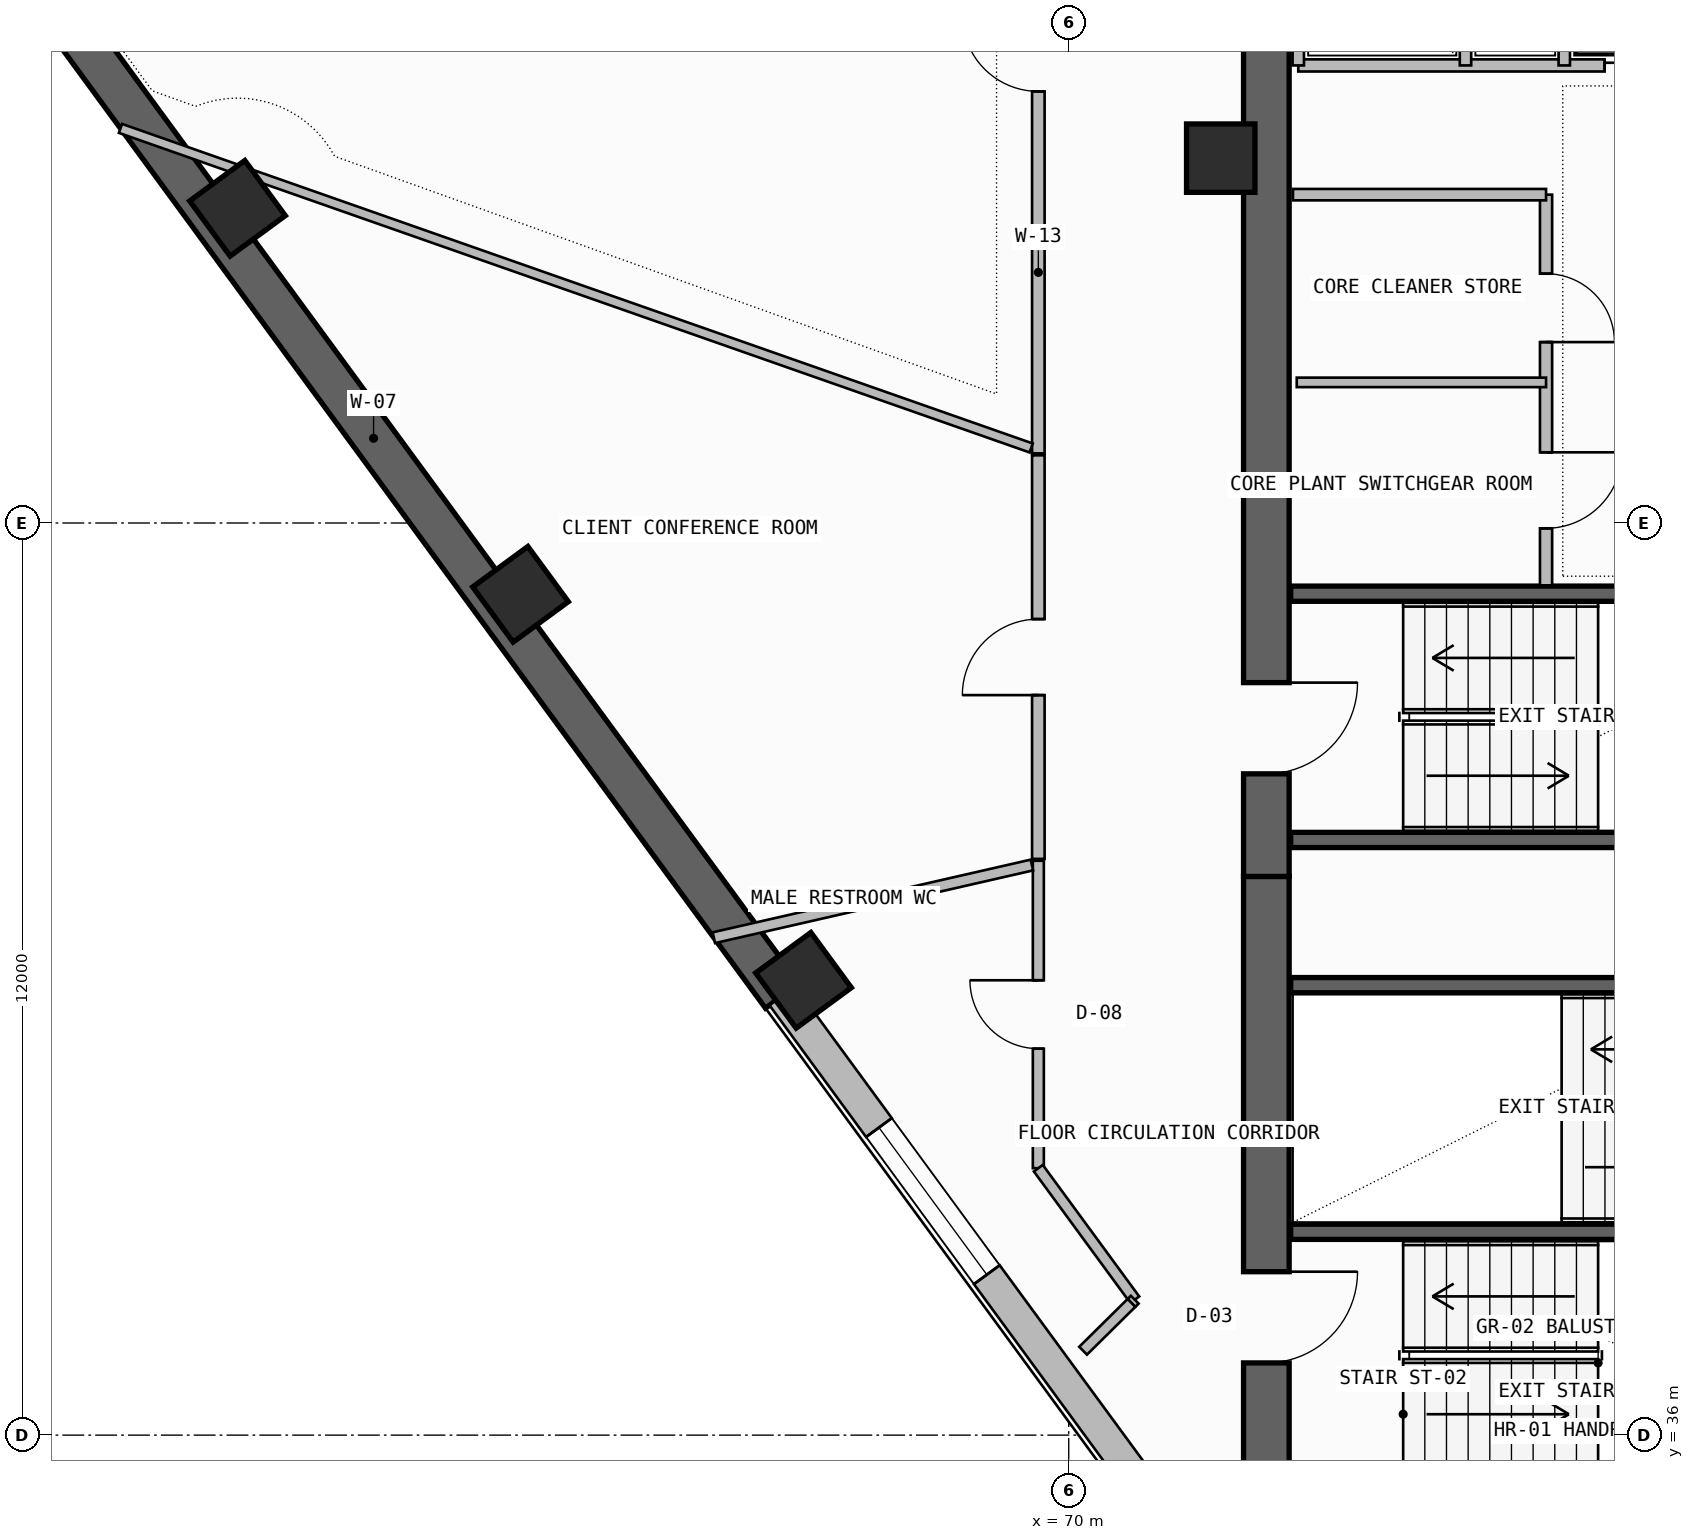
"""IFC4 building model, lengths in metres.
Left out: names, types, materials, properties, quantities, classifications, styles, units other than length and angle.
Written with IfcOpenShell. Run it as: python <this file> out.ifc"""

import sys

from ifc_helpers import new_model, si_unit, direction, frame, frame_2d, origin, origin_2d, place, context, subcontext, project, spatial, rectangle, extrude, element, fill, save


model = new_model("IFC4")
c1 = context("Model", 3, precision=1e-05, world=origin(), true_north=direction((0.0, 1.0)))
c2 = subcontext(c1, "Body", "Model", "MODEL_VIEW")
j1 = project(units=[si_unit("LENGTHUNIT", "METRE"), si_unit("PLANEANGLEUNIT", "RADIAN")], contexts=[c1])
p1 = place(None, origin())
s1 = spatial("IfcSite", under=j1, at=p1, CompositionType="ELEMENT")
p2 = place(p1, origin())
s2 = spatial("IfcBuilding", under=s1, at=p2, CompositionType="ELEMENT")
p3 = place(p2, frame((0.0, 0.0, 232.58)))
s3 = spatial("IfcBuildingStorey", under=s2, at=p3, CompositionType="ELEMENT", Elevation=232.58)
p4 = place(p3, frame((72.6, 35.5, -0.26), z_axis=(0.0, 0.0, 1.0), x_axis=(0.0, 1.0, 0.0)))
e1 = element("IfcWall", 1, at=p4, inside=s3, PredefinedType="SHEAR", context=c2, shape_type="SweptSolid", body=[
    extrude(rectangle(XDim=7.85, YDim=0.6, at=frame_2d((3.925, 0.0))), origin(), (0.0, 0.0, 1.0), 3.52),
])
p5 = place(p4, frame((1.45, 0.0, 0.26)))
e2 = element("IfcOpeningElement", 2, at=p5, cuts=e1, PredefinedType="OPENING", context=c2, shape_type="SweptSolid", body=[
    extrude(rectangle(XDim=1.2, YDim=2.2, at=frame_2d((0.6, 1.1))), frame((0.0, 0.31, 0.0), z_axis=(0.0, -1.0, 0.0), x_axis=(1.0, 0.0, 0.0)), (0.0, 0.0, 1.0), 0.62),
])
p6 = place(p3, frame((72.6, 43.35, -0.26), z_axis=(0.0, 0.0, 1.0), x_axis=(0.0, 1.0, 0.0)))
e3 = element("IfcWall", 3, at=p6, inside=s3, PredefinedType="SHEAR", context=c2, shape_type="SweptSolid", body=[
    extrude(rectangle(XDim=12.7, YDim=0.6, at=frame_2d((6.35, 0.0))), origin(), (0.0, 0.0, 1.0), 3.52),
])
p7 = place(p6, frame((1.35, 0.0, 0.26)))
e4 = element("IfcOpeningElement", 4, at=p7, cuts=e3, PredefinedType="OPENING", context=c2, shape_type="SweptSolid", body=[
    extrude(rectangle(XDim=1.2, YDim=2.2, at=frame_2d((0.6, 1.1))), frame((0.0, 0.31, 0.0), z_axis=(0.0, -1.0, 0.0), x_axis=(1.0, 0.0, 0.0)), (0.0, 0.0, 1.0), 0.62),
])
p8 = place(p3, frame((72.0, 52.8, 0.0), z_axis=(0.0, 0.0, 1.0), x_axis=(1.0, 0.0, 0.0)))
e5 = element("IfcColumn", 5, at=p8, inside=s3, PredefinedType="COLUMN", context=c2, shape_type="SweptSolid", body=[
    extrude(rectangle(XDim=0.9, YDim=0.9, at=origin_2d()), origin(), (0.0, 0.0, 1.0), 3.52),
])
for number, where, z_axis, x_axis in (
    (6, (59.063, 52.14, -0.26), (0.0, 0.0, 1.0), (-0.591, 0.806, 0.0)),
    (7, (62.787, 47.062, -0.26), (0.0, 0.0, 1.0), (-0.591, 0.806, 0.0)),
):
    element("IfcColumn", number, at=place(p3, frame(where, z_axis=z_axis, x_axis=x_axis)), inside=s3, PredefinedType="COLUMN", context=c2, shape_type="SweptSolid", body=[
        extrude(rectangle(XDim=0.9, YDim=0.9, at=origin_2d()), origin(), (0.0, 0.0, 1.0), 3.78),
    ])
p9 = place(p3, frame((66.51, 41.983, 0.0), z_axis=(0.0, 0.0, 1.0), x_axis=(-0.591309648364, 0.806444604267, 0.0)))
e8 = element("IfcColumn", 8, at=p9, inside=s3, PredefinedType="COLUMN", context=c2, shape_type="SweptSolid", body=[
    extrude(rectangle(XDim=0.9, YDim=0.9, at=origin_2d()), origin(), (0.0, 0.0, 1.0), 3.52),
])
p10 = place(p3, frame((55.475, 56.45, -0.26), z_axis=(0.0, 0.0, 1.0), x_axis=(0.591309555876, -0.806444672082, 0.0)))
e9 = element("IfcWall", 9, at=p10, inside=s3, PredefinedType="SHEAR", context=c2, shape_type="SweptSolid", body=[
    extrude(rectangle(XDim=18.192, YDim=0.55, at=frame_2d((9.096, 0.0))), origin(), (0.0, 0.0, 1.0), 3.52),
])
p11 = place(p3, frame((66.232, 41.779, 0.0), z_axis=(0.0, 0.0, 1.0), x_axis=(0.591309008949, -0.806445073105, 0.0)))
e10 = element("IfcWall", 10, at=p11, inside=s3, PredefinedType="SOLIDWALL", context=c2, shape_type="SweptSolid", body=[
    extrude(rectangle(XDim=8.908, YDim=0.42, at=frame_2d((4.454, 0.0))), origin(), (0.0, 0.0, 1.0), 2.645),
])
p12 = place(p11, frame((2.149, 0.0, 1.1)))
e11 = element("IfcOpeningElement", 11, at=p12, cuts=e10, PredefinedType="OPENING", context=c2, shape_type="SweptSolid", body=[
    extrude(rectangle(XDim=2.4, YDim=1.2, at=frame_2d((1.2, 0.6))), frame((0.0, 0.22, 0.0), z_axis=(0.0, -1.0, 0.0), x_axis=(1.0, 0.0, 0.0)), (0.0, 0.0, 1.0), 0.44),
])
p13 = place(p3, frame((72.92, 38.675, -0.26), z_axis=(0.0, 0.0, 1.0), x_axis=(1.0, 0.0, 0.0)))
e12 = element("IfcWall", 12, at=p13, inside=s3, PredefinedType="SOLIDWALL", context=c2, shape_type="SweptSolid", body=[
    extrude(rectangle(XDim=7.7, YDim=0.2, at=frame_2d((3.85, 0.0))), origin(), (0.0, 0.0, 1.0), 3.52),
])
p14 = place(p3, frame((72.92, 41.92, -0.26), z_axis=(0.0, 0.0, 1.0), x_axis=(1.0, 0.0, 0.0)))
e13 = element("IfcWall", 13, at=p14, inside=s3, PredefinedType="SOLIDWALL", context=c2, shape_type="SweptSolid", body=[
    extrude(rectangle(XDim=7.58, YDim=0.2, at=frame_2d((3.79, 0.0))), origin(), (0.0, 0.0, 1.0), 3.52),
])
for number, where, z_axis, x_axis in (
    (14, (72.92, 43.83, -0.26), (0.0, 0.0, 1.0), (1.0, 0.0, 0.0)),
    (15, (72.92, 47.07, -0.26), (0.0, 0.0, 1.0), (1.0, 0.0, 0.0)),
):
    element("IfcWall", number, at=place(p3, frame(where, z_axis=z_axis, x_axis=x_axis)), inside=s3, PredefinedType="SOLIDWALL", context=c2, shape_type="SweptSolid", body=[
        extrude(rectangle(XDim=7.7, YDim=0.2, at=frame_2d((3.85, 0.0))), origin(), (0.0, 0.0, 1.0), 3.52),
    ])
p15 = place(p3, frame((76.28, 47.18, 0.0), z_axis=(0.0, 0.0, 1.0), x_axis=(0.0, 1.0, 0.0)))
e16 = element("IfcWall", 16, at=p15, inside=s3, PredefinedType="SOLIDWALL", context=c2, shape_type="SweptSolid", body=[
    extrude(rectangle(XDim=5.14, YDim=0.16, at=frame_2d((2.57, 0.0))), origin(), (0.0, 0.0, 1.0), 3.26),
])
p16 = place(p15, frame((0.75, 0.0, 0.0)))
e17 = element("IfcOpeningElement", 17, at=p16, cuts=e16, PredefinedType="OPENING", context=c2, shape_type="SweptSolid", body=[
    extrude(rectangle(XDim=1.0, YDim=2.2, at=frame_2d((0.5, 1.1))), frame((0.0, 0.09, 0.0), z_axis=(0.0, -1.0, 0.0), x_axis=(1.0, 0.0, 0.0)), (0.0, 0.0, 1.0), 0.18),
])
p17 = place(p15, frame((3.2, 0.0, 0.0)))
e18 = element("IfcOpeningElement", 18, at=p17, cuts=e16, PredefinedType="OPENING", context=c2, shape_type="SweptSolid", body=[
    extrude(rectangle(XDim=0.9, YDim=2.1, at=frame_2d((0.45, 1.05))), frame((0.0, 0.09, 0.0), z_axis=(0.0, -1.0, 0.0), x_axis=(1.0, 0.0, 0.0)), (0.0, 0.0, 1.0), 0.18),
])
p18 = place(p3, frame((72.95, 52.32, 0.0), z_axis=(0.0, 0.0, 1.0), x_axis=(1.0, 0.0, 0.0)))
e19 = element("IfcWall", 19, at=p18, inside=s3, PredefinedType="SOLIDWALL", context=c2, shape_type="SweptSolid", body=[
    extrude(rectangle(XDim=3.33, YDim=0.15, at=frame_2d((1.665, 0.0))), origin(), (0.0, 0.0, 1.0), 3.26),
])
p19 = place(p3, frame((73.0, 49.85, 0.0), z_axis=(0.0, 0.0, 1.0), x_axis=(1.0, 0.0, 0.0)))
e20 = element("IfcWall", 20, at=p19, inside=s3, PredefinedType="PARTITIONING", context=c2, shape_type="SweptSolid", body=[
    extrude(rectangle(XDim=3.28, YDim=0.125, at=frame_2d((1.64, 0.0))), origin(), (0.0, 0.0, 1.0), 3.26),
])
p20 = place(p3, frame((73.02, 54.02, 0.0), z_axis=(0.0, 0.0, 1.0), x_axis=(1.0, 0.0, 0.0)))
e21 = element("IfcWall", 21, at=p20, inside=s3, PredefinedType="SOLIDWALL", context=c2, shape_type="SweptSolid", body=[
    extrude(rectangle(XDim=12.08, YDim=0.16, at=frame_2d((6.04, 0.0))), origin(), (0.0, 0.0, 1.0), 3.26),
])
p21 = place(p20, frame((4.03, 0.0, 0.0)))
e22 = element("IfcOpeningElement", 22, at=p21, cuts=e21, PredefinedType="OPENING", context=c2, shape_type="SweptSolid", body=[
    extrude(rectangle(XDim=1.1, YDim=2.25, at=frame_2d((0.55, 1.125))), frame((0.0, 0.09, 0.0), z_axis=(0.0, -1.0, 0.0), x_axis=(1.0, 0.0, 0.0)), (0.0, 0.0, 1.0), 0.18),
])
p22 = place(p20, frame((6.28, 0.0, 0.0)))
e23 = element("IfcOpeningElement", 23, at=p22, cuts=e21, PredefinedType="OPENING", context=c2, shape_type="SweptSolid", body=[
    extrude(rectangle(XDim=1.1, YDim=2.25, at=frame_2d((0.55, 1.125))), frame((0.0, 0.09, 0.0), z_axis=(0.0, -1.0, 0.0), x_axis=(1.0, 0.0, 0.0)), (0.0, 0.0, 1.0), 0.18),
])
p23 = place(p20, frame((8.53, 0.0, 0.0)))
e24 = element("IfcOpeningElement", 24, at=p23, cuts=e21, PredefinedType="OPENING", context=c2, shape_type="SweptSolid", body=[
    extrude(rectangle(XDim=1.1, YDim=2.25, at=frame_2d((0.55, 1.125))), frame((0.0, 0.09, 0.0), z_axis=(0.0, -1.0, 0.0), x_axis=(1.0, 0.0, 0.0)), (0.0, 0.0, 1.0), 0.18),
])
p24 = place(p3, frame((73.02, 54.02, 0.0), z_axis=(0.0, 0.0, 1.0), x_axis=(0.0, 1.0, 0.0)))
e25 = element("IfcWall", 25, at=p24, inside=s3, PredefinedType="PLUMBINGWALL", context=c2, shape_type="SweptSolid", body=[
    extrude(rectangle(XDim=1.94, YDim=0.15, at=frame_2d((0.97, 0.0))), origin(), (0.0, 0.0, 1.0), 3.26),
])
p25 = place(p3, frame((76.52, 54.02, 0.0), z_axis=(0.0, 0.0, 1.0), x_axis=(0.0, 1.0, 0.0)))
e26 = element("IfcWall", 26, at=p25, inside=s3, PredefinedType="SOLIDWALL", context=c2, shape_type="SweptSolid", body=[
    extrude(rectangle(XDim=1.94, YDim=0.15, at=frame_2d((0.97, 0.0))), origin(), (0.0, 0.0, 1.0), 3.26),
])
p26 = place(p3, frame((75.22, 54.02, 0.0), z_axis=(0.0, 0.0, 1.0), x_axis=(0.0, 1.0, 0.0)))
e27 = element("IfcWall", 27, at=p26, inside=s3, PredefinedType="PLUMBINGWALL", context=c2, shape_type="SweptSolid", body=[
    extrude(rectangle(XDim=1.94, YDim=0.15, at=frame_2d((0.97, 0.0))), origin(), (0.0, 0.0, 1.0), 3.26),
])
p27 = place(p3, frame((69.6, 43.556, 0.0), z_axis=(0.0, 0.0, 1.0), x_axis=(0.0, -1.0, 0.0)))
e28 = element("IfcWall", 28, at=p27, inside=s3, PredefinedType="PARTITIONING", context=c2, shape_type="SweptSolid", body=[
    extrude(rectangle(XDim=4.045, YDim=0.145, at=frame_2d((2.022, 0.0))), origin(), (0.0, 0.0, 1.0), 3.26),
])
p28 = place(p27, frame((1.572, 0.0, 0.0)))
e29 = element("IfcOpeningElement", 29, at=p28, cuts=e28, PredefinedType="OPENING", context=c2, shape_type="SweptSolid", body=[
    extrude(rectangle(XDim=0.9, YDim=2.1, at=frame_2d((0.45, 1.05))), frame((0.0, 0.083, 0.0), z_axis=(0.0, -1.0, 0.0), x_axis=(1.0, 0.0, 0.0)), (0.0, 0.0, 1.0), 0.165),
])
p29 = place(p3, frame((69.6, 39.512, 0.0), z_axis=(0.0, 0.0, 1.0), x_axis=(0.5912600426, -0.806480974372, 0.0)))
e30 = element("IfcWall", 30, at=p29, inside=s3, PredefinedType="PARTITIONING", context=c2, shape_type="SweptSolid", body=[
    extrude(rectangle(XDim=2.145, YDim=0.145, at=frame_2d((1.073, 0.0))), origin(), (0.0, 0.0, 1.0), 3.26),
])
p30 = place(p3, frame((70.868, 37.782, 0.0), z_axis=(0.0, 0.0, 1.0), x_axis=(-0.709118452534, -0.705089370417, 0.0)))
e31 = element("IfcWall", 31, at=p30, inside=s3, PredefinedType="PARTITIONING", context=c2, shape_type="SweptSolid", body=[
    extrude(rectangle(XDim=0.061, YDim=0.145, at=frame_2d((0.03, 0.0))), origin(), (0.0, 0.0, 1.0), 3.26),
])
p31 = place(p3, frame((65.331, 42.544, 0.0), z_axis=(0.0, 0.0, 1.0), x_axis=(0.974854976518, 0.222840244924, 0.0)))
e32 = element("IfcWall", 32, at=p31, inside=s3, PredefinedType="PARTITIONING", context=c2, shape_type="SweptSolid", body=[
    extrude(rectangle(XDim=4.292, YDim=0.145, at=frame_2d((2.146, 0.0))), origin(), (0.0, 0.0, 1.0), 2.645),
])
p32 = place(p3, frame((69.6, 57.335, 0.0), z_axis=(0.0, 0.0, 1.0), x_axis=(0.0, -1.0, 0.0)))
e33 = element("IfcWall", 33, at=p32, inside=s3, PredefinedType="PARTITIONING", context=c2, shape_type="SweptSolid", body=[
    extrude(rectangle(XDim=8.419, YDim=0.165, at=frame_2d((4.209, 0.0))), origin(), (0.0, 0.0, 1.0), 2.745),
])
p33 = place(p32, frame((2.656, 0.0, 0.0)))
e34 = element("IfcOpeningElement", 34, at=p33, cuts=e33, PredefinedType="OPENING", context=c2, shape_type="SweptSolid", body=[
    extrude(rectangle(XDim=1.0, YDim=2.2, at=frame_2d((0.5, 1.1))), frame((0.0, 0.093, 0.0), z_axis=(0.0, -1.0, 0.0), x_axis=(1.0, 0.0, 0.0)), (0.0, 0.0, 1.0), 0.185),
])
p34 = place(p3, frame((69.506, 48.987, 0.0), z_axis=(0.0, 0.0, 1.0), x_axis=(-0.943602089714, 0.331081706363, 0.0)))
e35 = element("IfcWall", 35, at=p34, inside=s3, PredefinedType="PARTITIONING", context=c2, shape_type="SweptSolid", body=[
    extrude(rectangle(XDim=12.698, YDim=0.125, at=frame_2d((6.349, 0.0))), origin(), (0.0, 0.0, 1.0), 2.645),
])
p35 = place(p3, frame((69.6, 48.89, 0.0), z_axis=(0.0, 0.0, 1.0), x_axis=(0.0, -1.0, 0.0)))
e36 = element("IfcWall", 36, at=p35, inside=s3, PredefinedType="PARTITIONING", context=c2, shape_type="SweptSolid", body=[
    extrude(rectangle(XDim=5.309, YDim=0.165, at=frame_2d((2.655, 0.0))), origin(), (0.0, 0.0, 1.0), 3.26),
])
p36 = place(p35, frame((2.155, 0.0, 0.0)))
e37 = element("IfcOpeningElement", 37, at=p36, cuts=e36, PredefinedType="OPENING", context=c2, shape_type="SweptSolid", body=[
    extrude(rectangle(XDim=1.0, YDim=2.2, at=frame_2d((0.5, 1.1))), frame((0.0, 0.093, 0.0), z_axis=(0.0, -1.0, 0.0), x_axis=(1.0, 0.0, 0.0)), (0.0, 0.0, 1.0), 0.185),
])
p37 = place(p3, frame((70.825, 37.739, 0.0), z_axis=(0.0, 0.0, 1.0), x_axis=(-0.711459757435, -0.702726841348, 0.0)))
e38 = element("IfcWall", 38, at=p37, inside=s3, PredefinedType="PARTITIONING", context=c2, shape_type="SweptSolid", body=[
    extrude(rectangle(XDim=0.895, YDim=0.145, at=frame_2d((0.447, 0.0))), origin(), (0.0, 0.0, 1.0), 3.26),
])
p38 = place(p12, origin())
e39 = element("IfcWindow", 39, at=p38, inside=s3, PartitioningType="SINGLE_PANEL", PredefinedType="WINDOW", context=c2, shape_type="SweptSolid", body=[
    extrude(rectangle(XDim=2.4, YDim=1.2, at=frame_2d((1.2, 0.6))), frame((0.0, 0.03, 0.0), z_axis=(0.0, -1.0, 0.0), x_axis=(1.0, 0.0, 0.0)), (0.0, 0.0, 1.0), 0.06),
])
fill(e11, e39)
p39 = place(p5, frame((1.2, 0.0, 0.0), z_axis=(0.0, 0.0, 1.0), x_axis=(-1.0, 0.0, 0.0)))
e40 = element("IfcDoor", 40, at=p39, inside=s3, OperationType="SINGLE_SWING_LEFT", PredefinedType="USERDEFINED", context=c2, shape_type="SweptSolid", body=[
    extrude(rectangle(XDim=1.2, YDim=2.2, at=frame_2d((0.6, 1.1))), frame((0.0, 0.025, 0.0), z_axis=(0.0, -1.0, 0.0), x_axis=(1.0, 0.0, 0.0)), (0.0, 0.0, 1.0), 0.05),
])
fill(e2, e40)
p40 = place(p7, frame((1.2, 0.0, 0.0), z_axis=(0.0, 0.0, 1.0), x_axis=(-1.0, 0.0, 0.0)))
e41 = element("IfcDoor", 41, at=p40, inside=s3, OperationType="SINGLE_SWING_LEFT", PredefinedType="USERDEFINED", context=c2, shape_type="SweptSolid", body=[
    extrude(rectangle(XDim=1.2, YDim=2.2, at=frame_2d((0.6, 1.1))), frame((0.0, 0.025, 0.0), z_axis=(0.0, -1.0, 0.0), x_axis=(1.0, 0.0, 0.0)), (0.0, 0.0, 1.0), 0.05),
])
fill(e4, e41)
p41 = place(p16, frame((1.0, 0.0, 0.0), z_axis=(0.0, 0.0, 1.0), x_axis=(-1.0, 0.0, 0.0)))
e42 = element("IfcDoor", 42, at=p41, inside=s3, OperationType="SINGLE_SWING_LEFT", PredefinedType="DOOR", context=c2, shape_type="SweptSolid", body=[
    extrude(rectangle(XDim=1.0, YDim=2.2, at=frame_2d((0.5, 1.1))), frame((0.0, 0.025, 0.0), z_axis=(0.0, -1.0, 0.0), x_axis=(1.0, 0.0, 0.0)), (0.0, 0.0, 1.0), 0.05),
])
fill(e17, e42)
p42 = place(p17, frame((0.9, 0.0, 0.0), z_axis=(0.0, 0.0, 1.0), x_axis=(-1.0, 0.0, 0.0)))
e43 = element("IfcDoor", 43, at=p42, inside=s3, OperationType="SINGLE_SWING_RIGHT", PredefinedType="DOOR", context=c2, shape_type="SweptSolid", body=[
    extrude(rectangle(XDim=0.9, YDim=2.1, at=frame_2d((0.45, 1.05))), frame((0.0, 0.025, 0.0), z_axis=(0.0, -1.0, 0.0), x_axis=(1.0, 0.0, 0.0)), (0.0, 0.0, 1.0), 0.05),
])
fill(e18, e43)
p43 = place(p21, origin())
e44 = element("IfcDoor", 44, at=p43, inside=s3, OperationType="DOUBLE_DOOR_SLIDING", PredefinedType="DOOR", context=c2, shape_type="SweptSolid", body=[
    extrude(rectangle(XDim=1.1, YDim=2.25, at=frame_2d((0.55, 1.125))), frame((0.0, 0.025, 0.0), z_axis=(0.0, -1.0, 0.0), x_axis=(1.0, 0.0, 0.0)), (0.0, 0.0, 1.0), 0.05),
])
fill(e22, e44)
p44 = place(p28, frame((0.9, 0.0, 0.0), z_axis=(0.0, 0.0, 1.0), x_axis=(-1.0, 0.0, 0.0)))
e45 = element("IfcDoor", 45, at=p44, inside=s3, OperationType="SINGLE_SWING_RIGHT", PredefinedType="DOOR", context=c2, shape_type="SweptSolid", body=[
    extrude(rectangle(XDim=0.9, YDim=2.1, at=frame_2d((0.45, 1.05))), frame((0.0, 0.025, 0.0), z_axis=(0.0, -1.0, 0.0), x_axis=(1.0, 0.0, 0.0)), (0.0, 0.0, 1.0), 0.05),
])
fill(e29, e45)
p45 = place(p33, frame((1.0, 0.0, 0.0), z_axis=(0.0, 0.0, 1.0), x_axis=(-1.0, 0.0, 0.0)))
e46 = element("IfcDoor", 46, at=p45, inside=s3, OperationType="SINGLE_SWING_RIGHT", PredefinedType="DOOR", context=c2, shape_type="SweptSolid", body=[
    extrude(rectangle(XDim=1.0, YDim=2.2, at=frame_2d((0.5, 1.1))), frame((0.0, 0.025, 0.0), z_axis=(0.0, -1.0, 0.0), x_axis=(1.0, 0.0, 0.0)), (0.0, 0.0, 1.0), 0.05),
])
fill(e34, e46)
p46 = place(p36, frame((1.0, 0.0, 0.0), z_axis=(0.0, 0.0, 1.0), x_axis=(-1.0, 0.0, 0.0)))
e47 = element("IfcDoor", 47, at=p46, inside=s3, OperationType="SINGLE_SWING_LEFT", PredefinedType="DOOR", context=c2, shape_type="SweptSolid", body=[
    extrude(rectangle(XDim=1.0, YDim=2.2, at=frame_2d((0.5, 1.1))), frame((0.0, 0.025, 0.0), z_axis=(0.0, -1.0, 0.0), x_axis=(1.0, 0.0, 0.0)), (0.0, 0.0, 1.0), 0.05),
])
fill(e37, e47)
save(model, sys.argv[1])
